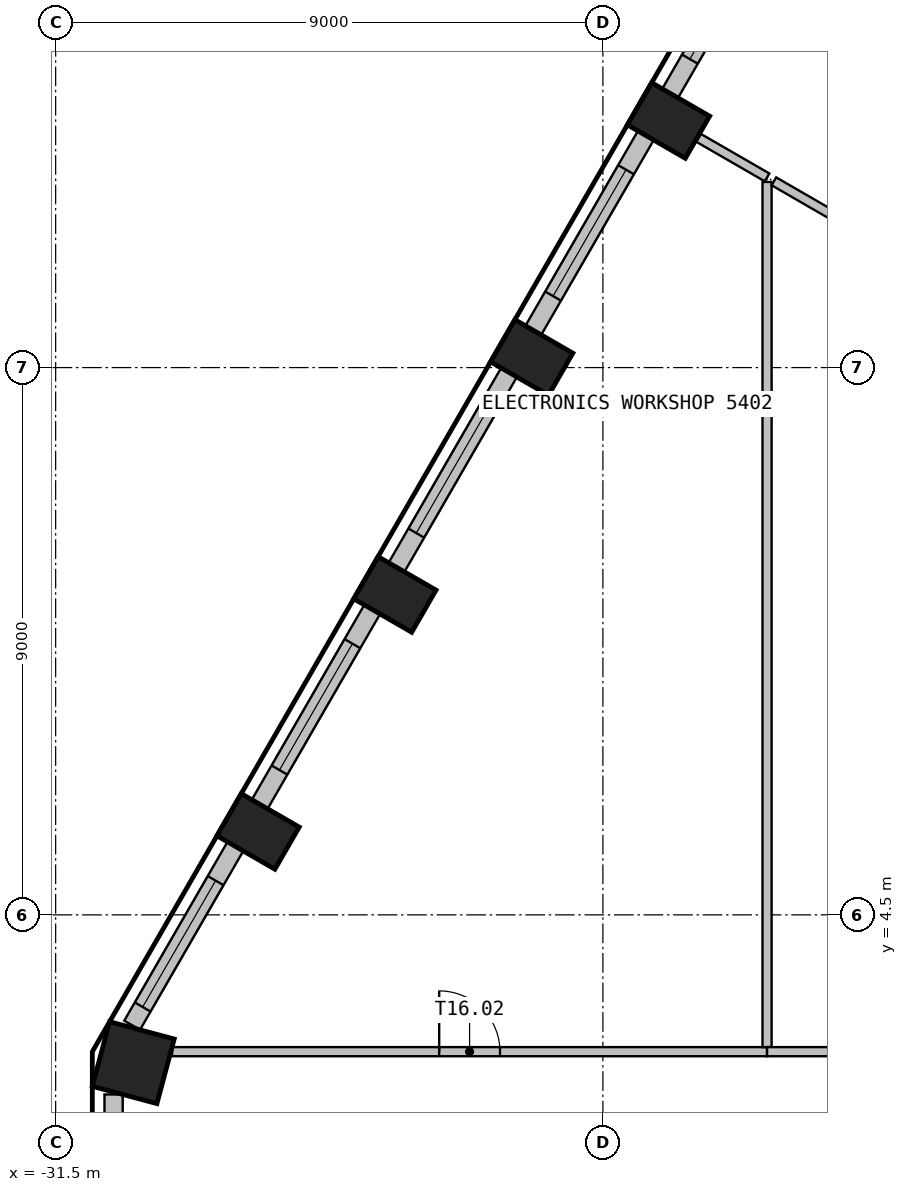
"""IFC4 building model, lengths in metres.
Left out: names, types, materials, properties, quantities, classifications, styles, units other than length and angle.
Written with IfcOpenShell. Run it as: python <this file> out.ifc"""

import sys

from ifc_helpers import new_model, si_unit, direction, frame, frame_2d, origin, origin_2d, place, context, subcontext, project, spatial, rectangle, extrude, element, fill, save


model = new_model("IFC4")
c1 = context("Model", 3, precision=1e-05, world=origin(), true_north=direction((0.0, 1.0)))
c2 = subcontext(c1, "Body", "Model", "MODEL_VIEW")
j1 = project(units=[si_unit("LENGTHUNIT", "METRE"), si_unit("PLANEANGLEUNIT", "RADIAN")], contexts=[c1])
p1 = place(None, origin())
s1 = spatial("IfcSite", under=j1, at=p1, CompositionType="ELEMENT")
p2 = place(p1, origin())
s2 = spatial("IfcBuilding", under=s1, at=p2, CompositionType="ELEMENT")
p3 = place(p2, frame((0.0, 0.0, 219.0)))
s3 = spatial("IfcBuildingStorey", under=s2, at=p3, CompositionType="ELEMENT", Elevation=219.0)
for number, where, z_axis, x_axis in (
    (1, (-21.421, 17.563, 0.0), (0.0, 0.0, 1.0), (-0.5, -0.866, 0.0)),
    (2, (-23.671, 13.666, 0.0), (0.0, 0.0, 1.0), (-0.5, -0.866, 0.0)),
    (3, (-25.921, 9.769, 0.0), (0.0, 0.0, 1.0), (-0.5, -0.866, 0.0)),
    (4, (-28.171, 5.872, 0.0), (0.0, 0.0, 1.0), (-0.5, -0.866, 0.0)),
):
    element("IfcColumn", number, at=place(p3, frame(where, z_axis=z_axis, x_axis=x_axis)), inside=s3, PredefinedType="COLUMN", context=c2, shape_type="SweptSolid", body=[
        extrude(rectangle(XDim=0.8, YDim=1.1, at=origin_2d()), origin(), (0.0, 0.0, 1.0), 3.55),
    ])
p4 = place(p3, frame((-30.223, 2.07, 0.0), z_axis=(0.0, 0.0, 1.0), x_axis=(-0.258819045103, -0.965925826289, 0.0)))
e5 = element("IfcColumn", 5, at=p4, inside=s3, PredefinedType="COLUMN", context=c2, shape_type="SweptSolid", body=[
    extrude(rectangle(XDim=1.1, YDim=1.1, at=origin_2d()), origin(), (0.0, 0.0, 1.0), 3.55),
])
p5 = place(p3, frame((-19.696, 20.951, 0.0), z_axis=(0.0, 0.0, 1.0), x_axis=(-0.500012868213, -0.866017974191, 0.0)))
e6 = element("IfcWall", 6, at=p5, inside=s3, PredefinedType="SOLIDWALL", context=c2, shape_type="SweptSolid", body=[
    extrude(rectangle(XDim=3.396, YDim=0.3, at=frame_2d((1.698, 0.0))), origin(), (0.0, 0.0, 1.0), 3.55),
])
p6 = place(p5, frame((0.346, 0.0, 0.9)))
e7 = element("IfcOpeningElement", 7, at=p6, cuts=e6, PredefinedType="OPENING", context=c2, shape_type="SweptSolid", body=[
    extrude(rectangle(XDim=2.4, YDim=2.1, at=frame_2d((1.2, 1.05))), frame((0.0, 0.16, 0.0), z_axis=(0.0, -1.0, 0.0), x_axis=(1.0, 0.0, 0.0)), (0.0, 0.0, 1.0), 0.32),
])
p7 = place(p3, frame((-21.794, 17.317, 0.0), z_axis=(0.0, 0.0, 1.0), x_axis=(-0.500029062817, -0.866008623709, 0.0)))
e8 = element("IfcWall", 8, at=p7, inside=s3, PredefinedType="SOLIDWALL", context=c2, shape_type="SweptSolid", body=[
    extrude(rectangle(XDim=3.699, YDim=0.3, at=frame_2d((1.85, 0.0))), origin(), (0.0, 0.0, 1.0), 3.55),
])
p8 = place(p7, frame((0.649, 0.0, 0.9)))
e9 = element("IfcOpeningElement", 9, at=p8, cuts=e8, PredefinedType="OPENING", context=c2, shape_type="SweptSolid", body=[
    extrude(rectangle(XDim=2.4, YDim=2.1, at=frame_2d((1.2, 1.05))), frame((0.0, 0.16, 0.0), z_axis=(0.0, -1.0, 0.0), x_axis=(1.0, 0.0, 0.0)), (0.0, 0.0, 1.0), 0.32),
])
p9 = place(p3, frame((-24.044, 13.419, 0.0), z_axis=(0.0, 0.0, 1.0), x_axis=(-0.500029062817, -0.866008623709, 0.0)))
e10 = element("IfcWall", 10, at=p9, inside=s3, PredefinedType="SOLIDWALL", context=c2, shape_type="SweptSolid", body=[
    extrude(rectangle(XDim=3.699, YDim=0.3, at=frame_2d((1.85, 0.0))), origin(), (0.0, 0.0, 1.0), 3.55),
])
p10 = place(p9, frame((0.649, 0.0, 0.9)))
e11 = element("IfcOpeningElement", 11, at=p10, cuts=e10, PredefinedType="OPENING", context=c2, shape_type="SweptSolid", body=[
    extrude(rectangle(XDim=2.4, YDim=2.1, at=frame_2d((1.2, 1.05))), frame((0.0, 0.16, 0.0), z_axis=(0.0, -1.0, 0.0), x_axis=(1.0, 0.0, 0.0)), (0.0, 0.0, 1.0), 0.32),
])
p11 = place(p3, frame((-26.294, 9.522, 0.0), z_axis=(0.0, 0.0, 1.0), x_axis=(-0.500029062817, -0.866008623709, 0.0)))
e12 = element("IfcWall", 12, at=p11, inside=s3, PredefinedType="SOLIDWALL", context=c2, shape_type="SweptSolid", body=[
    extrude(rectangle(XDim=3.699, YDim=0.3, at=frame_2d((1.85, 0.0))), origin(), (0.0, 0.0, 1.0), 3.55),
])
p12 = place(p11, frame((0.649, 0.0, 0.9)))
e13 = element("IfcOpeningElement", 13, at=p12, cuts=e12, PredefinedType="OPENING", context=c2, shape_type="SweptSolid", body=[
    extrude(rectangle(XDim=2.4, YDim=2.1, at=frame_2d((1.2, 1.05))), frame((0.0, 0.16, 0.0), z_axis=(0.0, -1.0, 0.0), x_axis=(1.0, 0.0, 0.0)), (0.0, 0.0, 1.0), 0.32),
])
p13 = place(p3, frame((-28.544, 5.625, 0.0), z_axis=(0.0, 0.0, 1.0), x_axis=(-0.500012868213, -0.866017974191, 0.0)))
e14 = element("IfcWall", 14, at=p13, inside=s3, PredefinedType="SOLIDWALL", context=c2, shape_type="SweptSolid", body=[
    extrude(rectangle(XDim=3.396, YDim=0.3, at=frame_2d((1.698, 0.0))), origin(), (0.0, 0.0, 1.0), 3.55),
])
p14 = place(p13, frame((0.649, 0.0, 0.9)))
e15 = element("IfcOpeningElement", 15, at=p14, cuts=e14, PredefinedType="OPENING", context=c2, shape_type="SweptSolid", body=[
    extrude(rectangle(XDim=2.4, YDim=2.1, at=frame_2d((1.2, 1.05))), frame((0.0, 0.16, 0.0), z_axis=(0.0, -1.0, 0.0), x_axis=(1.0, 0.0, 0.0)), (0.0, 0.0, 1.0), 0.32),
])
p15 = place(p3, frame((-30.547, 1.546, 0.0), z_axis=(0.0, 0.0, 1.0), x_axis=(0.0, -1.0, 0.0)))
e16 = element("IfcWall", 16, at=p15, inside=s3, PredefinedType="SOLIDWALL", context=c2, shape_type="SweptSolid", body=[
    extrude(rectangle(XDim=3.093, YDim=0.3, at=frame_2d((1.546, 0.0))), origin(), (0.0, 0.0, 1.0), 3.55),
])
p16 = place(p15, frame((0.346, 0.0, 0.9)))
e17 = element("IfcOpeningElement", 17, at=p16, cuts=e16, PredefinedType="OPENING", context=c2, shape_type="SweptSolid", body=[
    extrude(rectangle(XDim=2.4, YDim=2.1, at=frame_2d((1.2, 1.05))), frame((0.0, 0.16, 0.0), z_axis=(0.0, -1.0, 0.0), x_axis=(1.0, 0.0, 0.0)), (0.0, 0.0, 1.0), 0.32),
])
p17 = place(p3, frame((-29.585, 2.25, 0.0), z_axis=(0.0, 0.0, 1.0), x_axis=(1.0, 0.0, 0.0)))
e18 = element("IfcWall", 18, at=p17, inside=s3, PredefinedType="PARTITIONING", context=c2, shape_type="SweptSolid", body=[
    extrude(rectangle(XDim=9.785, YDim=0.15, at=frame_2d((4.893, 0.0))), origin(), (0.0, 0.0, 1.0), 3.55),
])
p18 = place(p17, frame((4.393, 0.0, 0.0)))
e19 = element("IfcOpeningElement", 19, at=p18, cuts=e18, PredefinedType="OPENING", context=c2, shape_type="SweptSolid", body=[
    extrude(rectangle(XDim=1.0, YDim=2.1, at=frame_2d((0.5, 1.05))), frame((0.0, 0.085, 0.0), z_axis=(0.0, -1.0, 0.0), x_axis=(1.0, 0.0, 0.0)), (0.0, 0.0, 1.0), 0.17),
])
p19 = place(p3, frame((-20.927, 17.278, 0.0), z_axis=(0.0, 0.0, 1.0), x_axis=(0.866157475642, -0.499771175029, 0.0)))
e20 = element("IfcWall", 20, at=p19, inside=s3, PredefinedType="PARTITIONING", context=c2, shape_type="SweptSolid", body=[
    extrude(rectangle(XDim=1.301, YDim=0.15, at=frame_2d((0.651, 0.0))), origin(), (0.0, 0.0, 1.0), 3.55),
])
p20 = place(p3, frame((-19.8, 16.553, 0.0), z_axis=(0.0, 0.0, 1.0), x_axis=(0.0, -1.0, 0.0)))
e21 = element("IfcWall", 21, at=p20, inside=s3, PredefinedType="PARTITIONING", context=c2, shape_type="SweptSolid", body=[
    extrude(rectangle(XDim=14.228, YDim=0.15, at=frame_2d((7.114, 0.0))), origin(), (0.0, 0.0, 1.0), 3.55),
])
p21 = place(p3, frame((-19.8, 2.25, 0.0), z_axis=(0.0, 0.0, 1.0), x_axis=(1.0, 0.0, 0.0)))
e22 = element("IfcWall", 22, at=p21, inside=s3, PredefinedType="PARTITIONING", context=c2, shape_type="SweptSolid", body=[
    extrude(rectangle(XDim=4.575, YDim=0.15, at=frame_2d((2.288, 0.0))), origin(), (0.0, 0.0, 1.0), 3.55),
])
p22 = place(p3, frame((-19.688, 16.563, 0.0), z_axis=(0.0, 0.0, 1.0), x_axis=(0.866012448988, -0.500022437694, 0.0)))
e23 = element("IfcWall", 23, at=p22, inside=s3, PredefinedType="PARTITIONING", context=c2, shape_type="SweptSolid", body=[
    extrude(rectangle(XDim=6.951, YDim=0.15, at=frame_2d((3.476, 0.0))), origin(), (0.0, 0.0, 1.0), 3.55),
])
p23 = place(p6, origin())
e24 = element("IfcWindow", 24, at=p23, inside=s3, PartitioningType="SINGLE_PANEL", PredefinedType="WINDOW", context=c2, shape_type="SweptSolid", body=[
    extrude(rectangle(XDim=2.4, YDim=2.1, at=frame_2d((1.2, 1.05))), frame((0.0, 0.03, 0.0), z_axis=(0.0, -1.0, 0.0), x_axis=(1.0, 0.0, 0.0)), (0.0, 0.0, 1.0), 0.06),
])
fill(e7, e24)
p24 = place(p8, origin())
e25 = element("IfcWindow", 25, at=p24, inside=s3, PartitioningType="SINGLE_PANEL", PredefinedType="WINDOW", context=c2, shape_type="SweptSolid", body=[
    extrude(rectangle(XDim=2.4, YDim=2.1, at=frame_2d((1.2, 1.05))), frame((0.0, 0.03, 0.0), z_axis=(0.0, -1.0, 0.0), x_axis=(1.0, 0.0, 0.0)), (0.0, 0.0, 1.0), 0.06),
])
fill(e9, e25)
p25 = place(p10, origin())
e26 = element("IfcWindow", 26, at=p25, inside=s3, PartitioningType="SINGLE_PANEL", PredefinedType="WINDOW", context=c2, shape_type="SweptSolid", body=[
    extrude(rectangle(XDim=2.4, YDim=2.1, at=frame_2d((1.2, 1.05))), frame((0.0, 0.03, 0.0), z_axis=(0.0, -1.0, 0.0), x_axis=(1.0, 0.0, 0.0)), (0.0, 0.0, 1.0), 0.06),
])
fill(e11, e26)
p26 = place(p12, origin())
e27 = element("IfcWindow", 27, at=p26, inside=s3, PartitioningType="SINGLE_PANEL", PredefinedType="WINDOW", context=c2, shape_type="SweptSolid", body=[
    extrude(rectangle(XDim=2.4, YDim=2.1, at=frame_2d((1.2, 1.05))), frame((0.0, 0.03, 0.0), z_axis=(0.0, -1.0, 0.0), x_axis=(1.0, 0.0, 0.0)), (0.0, 0.0, 1.0), 0.06),
])
fill(e13, e27)
p27 = place(p14, origin())
e28 = element("IfcWindow", 28, at=p27, inside=s3, PartitioningType="SINGLE_PANEL", PredefinedType="WINDOW", context=c2, shape_type="SweptSolid", body=[
    extrude(rectangle(XDim=2.4, YDim=2.1, at=frame_2d((1.2, 1.05))), frame((0.0, 0.03, 0.0), z_axis=(0.0, -1.0, 0.0), x_axis=(1.0, 0.0, 0.0)), (0.0, 0.0, 1.0), 0.06),
])
fill(e15, e28)
p28 = place(p18, origin())
e29 = element("IfcDoor", 29, at=p28, inside=s3, OperationType="SINGLE_SWING_LEFT", PredefinedType="DOOR", context=c2, shape_type="SweptSolid", body=[
    extrude(rectangle(XDim=1.0, YDim=2.1, at=frame_2d((0.5, 1.05))), frame((0.0, 0.025, 0.0), z_axis=(0.0, -1.0, 0.0), x_axis=(1.0, 0.0, 0.0)), (0.0, 0.0, 1.0), 0.05),
])
fill(e19, e29)
save(model, sys.argv[1])
